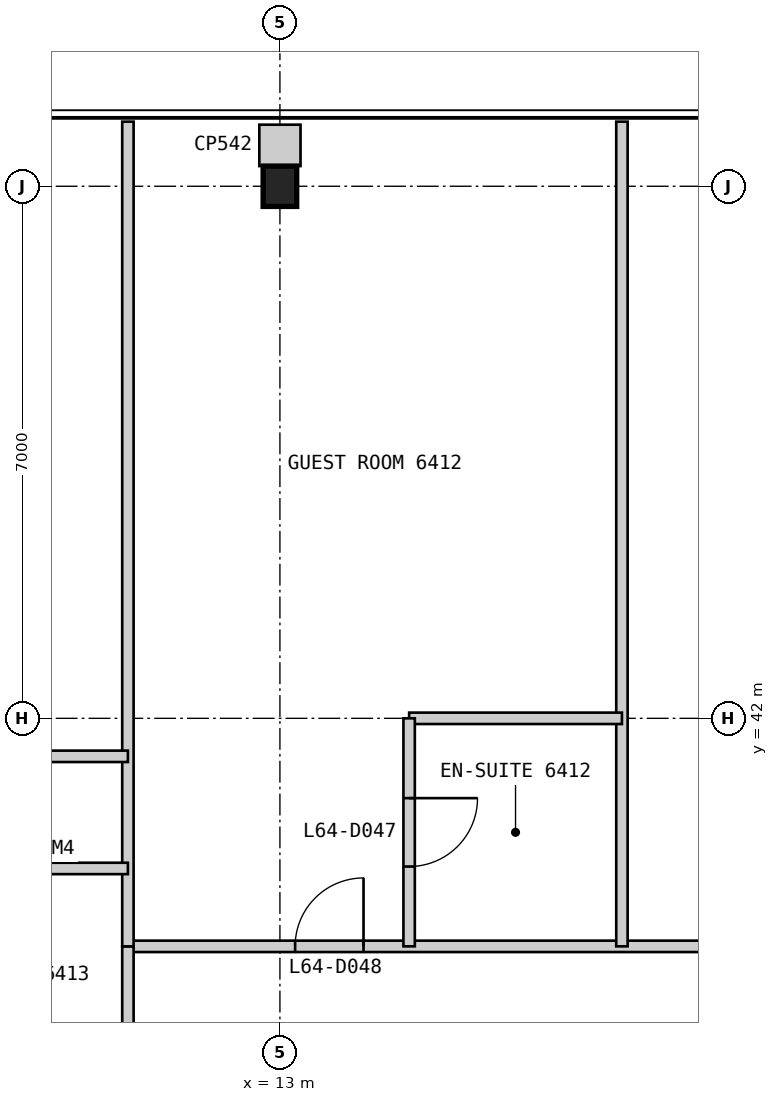
"""IFC4 building model, lengths in metres.
Left out: names, types, materials, properties, quantities, classifications, styles, units other than length and angle.
Written with IfcOpenShell. Run it as: python <this file> out.ifc"""

import sys

from ifc_helpers import new_model, si_unit, direction, frame, frame_2d, origin, origin_2d, place, context, subcontext, project, spatial, rectangle, i_section, extrude, element, fill, save


model = new_model("IFC4")
c1 = context("Model", 3, precision=1e-05, world=origin(), true_north=direction((0.0, 1.0)))
c2 = subcontext(c1, "Body", "Model", "MODEL_VIEW")
j1 = project(units=[si_unit("LENGTHUNIT", "METRE"), si_unit("PLANEANGLEUNIT", "RADIAN")], contexts=[c1])
p1 = place(None, origin())
s1 = spatial("IfcSite", under=j1, at=p1, CompositionType="ELEMENT")
p2 = place(p1, origin())
s2 = spatial("IfcBuilding", under=s1, at=p2, CompositionType="ELEMENT")
p3 = place(p2, frame((0.0, 0.0, 269.6)))
s3 = spatial("IfcBuildingStorey", under=s2, at=p3, CompositionType="ELEMENT", Elevation=269.6)
p4 = place(p3, frame((13.0, 49.0, 0.0), z_axis=(0.0, 0.0, 1.0), x_axis=(1.0, 0.0, 0.0)))
e1 = element("IfcColumn", 1, at=p4, inside=s3, PredefinedType="COLUMN", context=c2, shape_type="SweptSolid", body=[
    extrude(i_section(OverallWidth=0.442, OverallDepth=0.531, WebThickness=0.066, FlangeThickness=0.106, at=origin_2d()), origin(), (0.0, 0.0, 1.0), 3.4),
])
p5 = place(p3, frame((39.0, 39.0, 0.0), z_axis=(0.0, 0.0, 1.0), x_axis=(-1.0, 0.0, 0.0)))
e2 = element("IfcWall", 2, at=p5, inside=s3, PredefinedType="PARTITIONING", context=c2, shape_type="SweptSolid", body=[
    extrude(rectangle(XDim=28.0, YDim=0.15, at=frame_2d((14.0, 0.0))), origin(), (0.0, 0.0, 1.0), 2.844),
])
p6 = place(p5, frame((1.9, 0.0, 0.0)))
e3 = element("IfcOpeningElement", 3, at=p6, cuts=e2, PredefinedType="OPENING", context=c2, shape_type="SweptSolid", body=[
    extrude(rectangle(XDim=0.9, YDim=2.1, at=frame_2d((0.45, 1.05))), frame((0.0, 0.085, 0.0), z_axis=(0.0, -1.0, 0.0), x_axis=(1.0, 0.0, 0.0)), (0.0, 0.0, 1.0), 0.17),
])
p7 = place(p5, frame((5.2, 0.0, 0.0)))
e4 = element("IfcOpeningElement", 4, at=p7, cuts=e2, PredefinedType="OPENING", context=c2, shape_type="SweptSolid", body=[
    extrude(rectangle(XDim=0.9, YDim=2.1, at=frame_2d((0.45, 1.05))), frame((0.0, 0.085, 0.0), z_axis=(0.0, -1.0, 0.0), x_axis=(1.0, 0.0, 0.0)), (0.0, 0.0, 1.0), 0.17),
])
p8 = place(p5, frame((13.3, 0.0, 0.0)))
e5 = element("IfcOpeningElement", 5, at=p8, cuts=e2, PredefinedType="OPENING", context=c2, shape_type="SweptSolid", body=[
    extrude(rectangle(XDim=0.9, YDim=2.1, at=frame_2d((0.45, 1.05))), frame((0.0, 0.085, 0.0), z_axis=(0.0, -1.0, 0.0), x_axis=(1.0, 0.0, 0.0)), (0.0, 0.0, 1.0), 0.17),
])
p9 = place(p5, frame((24.9, 0.0, 0.0)))
e6 = element("IfcOpeningElement", 6, at=p9, cuts=e2, PredefinedType="OPENING", context=c2, shape_type="SweptSolid", body=[
    extrude(rectangle(XDim=0.9, YDim=2.1, at=frame_2d((0.45, 1.05))), frame((0.0, 0.085, 0.0), z_axis=(0.0, -1.0, 0.0), x_axis=(1.0, 0.0, 0.0)), (0.0, 0.0, 1.0), 0.17),
])
p10 = place(p3, frame((17.5, 49.85, 0.0), z_axis=(0.0, 0.0, 1.0), x_axis=(0.0, -1.0, 0.0)))
e7 = element("IfcWall", 7, at=p10, inside=s3, PredefinedType="PARTITIONING", context=c2, shape_type="SweptSolid", body=[
    extrude(rectangle(XDim=10.85, YDim=0.15, at=frame_2d((5.425, 0.0))), origin(), (0.0, 0.0, 1.0), 3.25),
])
p11 = place(p3, frame((17.5, 42.0, 0.0), z_axis=(0.0, 0.0, 1.0), x_axis=(-1.0, 0.0, 0.0)))
e8 = element("IfcWall", 8, at=p11, inside=s3, PredefinedType="PARTITIONING", context=c2, shape_type="SweptSolid", body=[
    extrude(rectangle(XDim=2.8, YDim=0.15, at=frame_2d((1.4, 0.0))), origin(), (0.0, 0.0, 1.0), 3.25),
])
p12 = place(p3, frame((14.7, 42.0, 0.0), z_axis=(0.0, 0.0, 1.0), x_axis=(0.0, -1.0, 0.0)))
e9 = element("IfcWall", 9, at=p12, inside=s3, PredefinedType="PARTITIONING", context=c2, shape_type="SweptSolid", body=[
    extrude(rectangle(XDim=3.0, YDim=0.15, at=frame_2d((1.5, 0.0))), origin(), (0.0, 0.0, 1.0), 3.25),
])
p13 = place(p12, frame((1.05, 0.0, 0.0)))
e10 = element("IfcOpeningElement", 10, at=p13, cuts=e9, PredefinedType="OPENING", context=c2, shape_type="SweptSolid", body=[
    extrude(rectangle(XDim=0.9, YDim=2.1, at=frame_2d((0.45, 1.05))), frame((0.0, 0.085, 0.0), z_axis=(0.0, -1.0, 0.0), x_axis=(1.0, 0.0, 0.0)), (0.0, 0.0, 1.0), 0.17),
])
p14 = place(p3, frame((11.0, 39.0, 0.0), z_axis=(0.0, 0.0, 1.0), x_axis=(0.0, -1.0, 0.0)))
e11 = element("IfcWall", 11, at=p14, inside=s3, PredefinedType="PARTITIONING", context=c2, shape_type="SweptSolid", body=[
    extrude(rectangle(XDim=28.0, YDim=0.15, at=frame_2d((14.0, 0.0))), origin(), (0.0, 0.0, 1.0), 2.844),
])
p15 = place(p14, frame((2.075, 0.0, 0.0)))
e12 = element("IfcOpeningElement", 12, at=p15, cuts=e11, PredefinedType="OPENING", context=c2, shape_type="SweptSolid", body=[
    extrude(rectangle(XDim=0.9, YDim=2.1, at=frame_2d((0.45, 1.05))), frame((0.0, 0.085, 0.0), z_axis=(0.0, -1.0, 0.0), x_axis=(1.0, 0.0, 0.0)), (0.0, 0.0, 1.0), 0.17),
])
p16 = place(p14, frame((5.2, 0.0, 0.0)))
e13 = element("IfcOpeningElement", 13, at=p16, cuts=e11, PredefinedType="OPENING", context=c2, shape_type="SweptSolid", body=[
    extrude(rectangle(XDim=0.9, YDim=2.1, at=frame_2d((0.45, 1.05))), frame((0.0, 0.085, 0.0), z_axis=(0.0, -1.0, 0.0), x_axis=(1.0, 0.0, 0.0)), (0.0, 0.0, 1.0), 0.17),
])
p17 = place(p14, frame((13.3, 0.0, 0.0)))
e14 = element("IfcOpeningElement", 14, at=p17, cuts=e11, PredefinedType="OPENING", context=c2, shape_type="SweptSolid", body=[
    extrude(rectangle(XDim=0.9, YDim=2.1, at=frame_2d((0.45, 1.05))), frame((0.0, 0.085, 0.0), z_axis=(0.0, -1.0, 0.0), x_axis=(1.0, 0.0, 0.0)), (0.0, 0.0, 1.0), 0.17),
])
p18 = place(p14, frame((24.9, 0.0, 0.0)))
e15 = element("IfcOpeningElement", 15, at=p18, cuts=e11, PredefinedType="OPENING", context=c2, shape_type="SweptSolid", body=[
    extrude(rectangle(XDim=0.9, YDim=2.1, at=frame_2d((0.45, 1.05))), frame((0.0, 0.085, 0.0), z_axis=(0.0, -1.0, 0.0), x_axis=(1.0, 0.0, 0.0)), (0.0, 0.0, 1.0), 0.17),
])
p19 = place(p3, frame((11.0, 49.85, 0.0), z_axis=(0.0, 0.0, 1.0), x_axis=(0.0, -1.0, 0.0)))
e16 = element("IfcWall", 16, at=p19, inside=s3, PredefinedType="PARTITIONING", context=c2, shape_type="SweptSolid", body=[
    extrude(rectangle(XDim=10.85, YDim=0.15, at=frame_2d((5.425, 0.0))), origin(), (0.0, 0.0, 1.0), 2.844),
])
p20 = place(p3, frame((8.0, 40.025, 0.0), z_axis=(0.0, 0.0, 1.0), x_axis=(1.0, 0.0, 0.0)))
e17 = element("IfcWall", 17, at=p20, inside=s3, PredefinedType="PARTITIONING", context=c2, shape_type="SweptSolid", body=[
    extrude(rectangle(XDim=3.0, YDim=0.15, at=frame_2d((1.5, 0.0))), origin(), (0.0, 0.0, 1.0), 3.25),
])
p21 = place(p3, frame((0.15, 41.5, 0.0), z_axis=(0.0, 0.0, 1.0), x_axis=(1.0, 0.0, 0.0)))
e18 = element("IfcWall", 18, at=p21, inside=s3, PredefinedType="PARTITIONING", context=c2, shape_type="SweptSolid", body=[
    extrude(rectangle(XDim=10.85, YDim=0.15, at=frame_2d((5.425, 0.0))), origin(), (0.0, 0.0, 1.0), 3.25),
])
p22 = place(p21, frame((5.0, 0.0, 0.0)))
e19 = element("IfcOpeningElement", 19, at=p22, cuts=e18, PredefinedType="OPENING", context=c2, shape_type="SweptSolid", body=[
    extrude(rectangle(XDim=0.9, YDim=2.1, at=frame_2d((0.45, 1.05))), frame((0.0, 0.085, 0.0), z_axis=(0.0, -1.0, 0.0), x_axis=(1.0, 0.0, 0.0)), (0.0, 0.0, 1.0), 0.17),
])
p23 = place(p3, frame((13.0, 49.81, 0.0), z_axis=(0.0, 0.0, 1.0), x_axis=(0.0, -1.0, 0.0)))
e20 = element("IfcWall", 20, at=p23, inside=s3, PredefinedType="PARTITIONING", context=c2, shape_type="SweptSolid", body=[
    extrude(rectangle(XDim=0.545, YDim=0.542, at=frame_2d((0.272, 0.0))), origin(), (0.0, 0.0, 1.0), 3.25),
])
p24 = place(p13, origin())
e21 = element("IfcDoor", 21, at=p24, inside=s3, OperationType="SINGLE_SWING_LEFT", PredefinedType="DOOR", context=c2, shape_type="SweptSolid", body=[
    extrude(rectangle(XDim=0.9, YDim=2.1, at=frame_2d((0.45, 1.05))), frame((0.0, 0.025, 0.0), z_axis=(0.0, -1.0, 0.0), x_axis=(1.0, 0.0, 0.0)), (0.0, 0.0, 1.0), 0.05),
])
fill(e10, e21)
p25 = place(p9, frame((0.9, 0.0, 0.0), z_axis=(0.0, 0.0, 1.0), x_axis=(-1.0, 0.0, 0.0)))
e22 = element("IfcDoor", 22, at=p25, inside=s3, OperationType="SINGLE_SWING_RIGHT", PredefinedType="DOOR", context=c2, shape_type="SweptSolid", body=[
    extrude(rectangle(XDim=0.9, YDim=2.1, at=frame_2d((0.45, 1.05))), frame((0.0, 0.025, 0.0), z_axis=(0.0, -1.0, 0.0), x_axis=(1.0, 0.0, 0.0)), (0.0, 0.0, 1.0), 0.05),
])
fill(e6, e22)
save(model, sys.argv[1])
